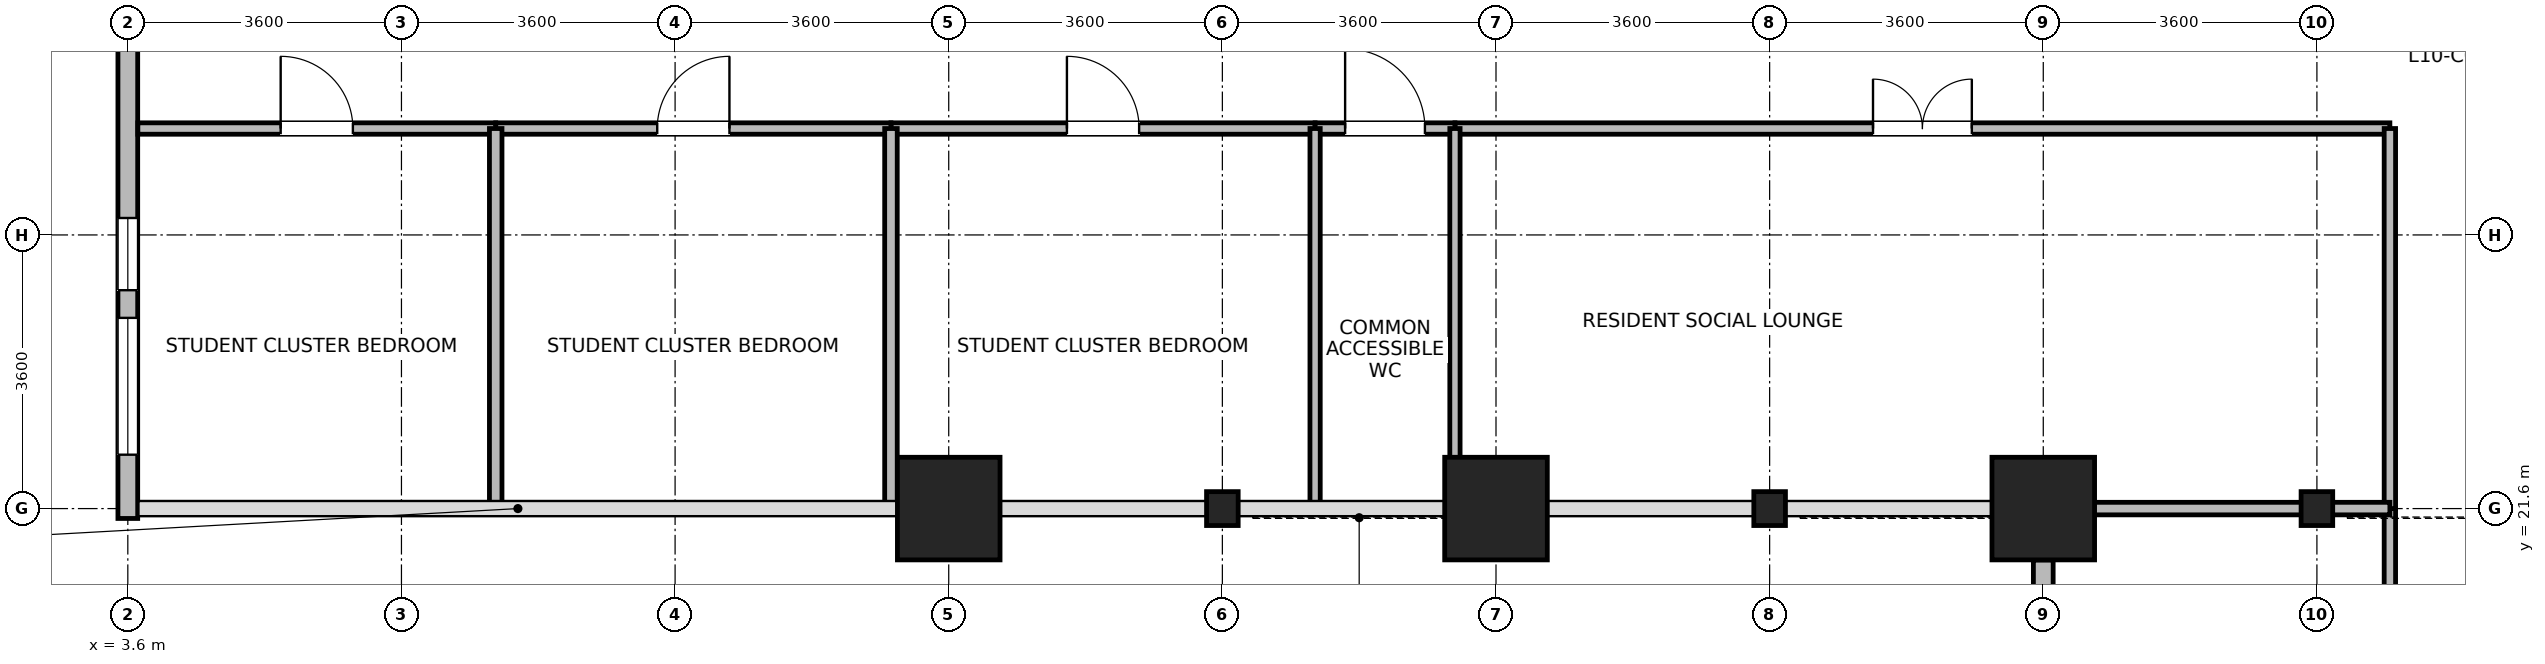
"""IFC4 building model, lengths in metres.
Left out: names, types, materials, properties, quantities, classifications, styles, units other than length and angle.
Written with IfcOpenShell. Run it as: python <this file> out.ifc"""

import sys

from ifc_helpers import new_model, si_unit, direction, frame, frame_2d, origin, origin_2d, place, context, subcontext, project, spatial, rectangle, i_section, extrude, source, transform, mapped, element, fill, save


model = new_model("IFC4")
c1 = context("Model", 3, precision=1e-05, world=origin(), true_north=direction((0.0, 1.0)))
c2 = subcontext(c1, "Body", "Model", "MODEL_VIEW")
j1 = project(units=[si_unit("LENGTHUNIT", "METRE"), si_unit("PLANEANGLEUNIT", "RADIAN")], contexts=[c1])
p1 = place(None, origin())
s1 = spatial("IfcSite", under=j1, at=p1, CompositionType="ELEMENT")
p2 = place(p1, origin())
s2 = spatial("IfcBuilding", under=s1, at=p2, CompositionType="ELEMENT")
p3 = place(p2, frame((0.0, 0.0, 43.8)))
s3 = spatial("IfcBuildingStorey", under=s2, at=p3, CompositionType="ELEMENT", Elevation=43.8)
m1 = source(origin(), c2, "Body", "SweptSolid", [
    extrude(rectangle(XDim=1.35, YDim=1.35, at=origin_2d()), origin(), (0.0, 0.0, 1.0), 3.7),
])
for number, where, z_axis, x_axis in (
    (1, (14.4, 21.6, 0.0), (0.0, 0.0, 1.0), (1.0, 0.0, 0.0)),
    (2, (21.6, 21.6, 0.0), (0.0, 0.0, 1.0), (1.0, 0.0, 0.0)),
    (3, (28.8, 21.6, 0.0), (0.0, 0.0, 1.0), (1.0, 0.0, 0.0)),
):
    element("IfcColumn", number, at=place(p3, frame(where, z_axis=z_axis, x_axis=x_axis)), inside=s3, PredefinedType="COLUMN", context=c2, shape_type="MappedRepresentation", body=[
        mapped(m1, transform((0.0, 0.0, 0.0), x_axis=(1.0, 0.0, 0.0), y_axis=(0.0, 1.0, 0.0), z_axis=(0.0, 0.0, 1.0), scale=1.0)),
    ])
m2 = source(origin(), c2, "Body", "SweptSolid", [
    extrude(i_section(OverallWidth=0.416, OverallDepth=0.446, WebThickness=0.029, FlangeThickness=0.04, FilletRadius=0.015, at=origin_2d()), origin(), (0.0, 0.0, 1.0), 3.7),
])
for number, where, z_axis, x_axis in (
    (4, (18.0, 21.6, 0.0), (0.0, 0.0, 1.0), (1.0, 0.0, 0.0)),
    (5, (25.2, 21.6, 0.0), (0.0, 0.0, 1.0), (1.0, 0.0, 0.0)),
    (6, (32.4, 21.6, 0.0), (0.0, 0.0, 1.0), (1.0, 0.0, 0.0)),
):
    element("IfcColumn", number, at=place(p3, frame(where, z_axis=z_axis, x_axis=x_axis)), inside=s3, PredefinedType="COLUMN", context=c2, shape_type="MappedRepresentation", body=[
        mapped(m2, transform((0.0, 0.0, 0.0), x_axis=(1.0, 0.0, 0.0), y_axis=(0.0, 1.0, 0.0), z_axis=(0.0, 0.0, 1.0), scale=1.0)),
    ])
p4 = place(p3, frame((3.6, 21.47, 0.0), z_axis=(0.0, 0.0, 1.0), x_axis=(0.0, 1.0, 0.0)))
e7 = element("IfcWall", 7, at=p4, inside=s3, PredefinedType="STANDARD", context=c2, shape_type="SweptSolid", body=[
    extrude(rectangle(XDim=6.956, YDim=0.26, at=frame_2d((3.478, 0.0))), origin(), (0.0, 0.0, 1.0), 3.43),
])
p5 = place(p4, frame((0.839, 0.0, 0.85)))
e8 = element("IfcOpeningElement", 8, at=p5, cuts=e7, PredefinedType="OPENING", context=c2, shape_type="SweptSolid", body=[
    extrude(rectangle(XDim=1.8, YDim=1.85, at=frame_2d((0.9, 0.925))), frame((0.0, 0.14, 0.0), z_axis=(0.0, -1.0, 0.0), x_axis=(1.0, 0.0, 0.0)), (0.0, 0.0, 1.0), 0.28),
])
p6 = place(p4, frame((3.003, 0.0, 0.85)))
e9 = element("IfcOpeningElement", 9, at=p6, cuts=e7, PredefinedType="OPENING", context=c2, shape_type="SweptSolid", body=[
    extrude(rectangle(XDim=0.95, YDim=1.75, at=frame_2d((0.475, 0.875))), frame((0.0, 0.14, 0.0), z_axis=(0.0, -1.0, 0.0), x_axis=(1.0, 0.0, 0.0)), (0.0, 0.0, 1.0), 0.28),
])
p7 = place(p3, frame((28.8, 1.67, 0.0), z_axis=(0.0, 0.0, 1.0), x_axis=(0.0, 1.0, 0.0)))
e10 = element("IfcWall", 10, at=p7, inside=s3, PredefinedType="STANDARD", context=c2, shape_type="SweptSolid", body=[
    extrude(rectangle(XDim=19.254, YDim=0.26, at=frame_2d((9.627, 0.0))), origin(), (0.0, 0.0, 1.0), 3.43),
])
p8 = place(p7, frame((0.705, 0.0, 0.85)))
e11 = element("IfcOpeningElement", 11, at=p8, cuts=e10, PredefinedType="OPENING", context=c2, shape_type="SweptSolid", body=[
    extrude(rectangle(XDim=1.8, YDim=1.85, at=frame_2d((0.9, 0.925))), frame((0.0, 0.14, 0.0), z_axis=(0.0, -1.0, 0.0), x_axis=(1.0, 0.0, 0.0)), (0.0, 0.0, 1.0), 0.28),
])
p9 = place(p7, frame((7.123, 0.0, 0.85)))
e12 = element("IfcOpeningElement", 12, at=p9, cuts=e10, PredefinedType="OPENING", context=c2, shape_type="SweptSolid", body=[
    extrude(rectangle(XDim=1.8, YDim=1.85, at=frame_2d((0.9, 0.925))), frame((0.0, 0.14, 0.0), z_axis=(0.0, -1.0, 0.0), x_axis=(1.0, 0.0, 0.0)), (0.0, 0.0, 1.0), 0.28),
])
p10 = place(p7, frame((10.332, 0.0, 0.85)))
e13 = element("IfcOpeningElement", 13, at=p10, cuts=e10, PredefinedType="OPENING", context=c2, shape_type="SweptSolid", body=[
    extrude(rectangle(XDim=1.8, YDim=1.85, at=frame_2d((0.9, 0.925))), frame((0.0, 0.14, 0.0), z_axis=(0.0, -1.0, 0.0), x_axis=(1.0, 0.0, 0.0)), (0.0, 0.0, 1.0), 0.28),
])
p11 = place(p7, frame((13.541, 0.0, 0.85)))
e14 = element("IfcOpeningElement", 14, at=p11, cuts=e10, PredefinedType="OPENING", context=c2, shape_type="SweptSolid", body=[
    extrude(rectangle(XDim=1.8, YDim=1.85, at=frame_2d((0.9, 0.925))), frame((0.0, 0.14, 0.0), z_axis=(0.0, -1.0, 0.0), x_axis=(1.0, 0.0, 0.0)), (0.0, 0.0, 1.0), 0.28),
])
p12 = place(p7, frame((16.75, 0.0, 0.85)))
e15 = element("IfcOpeningElement", 15, at=p12, cuts=e10, PredefinedType="OPENING", context=c2, shape_type="SweptSolid", body=[
    extrude(rectangle(XDim=1.8, YDim=1.85, at=frame_2d((0.9, 0.925))), frame((0.0, 0.14, 0.0), z_axis=(0.0, -1.0, 0.0), x_axis=(1.0, 0.0, 0.0)), (0.0, 0.0, 1.0), 0.28),
])
p13 = place(p3, frame((21.06, 26.6, 0.0), z_axis=(0.0, 0.0, 1.0), x_axis=(1.0, 0.0, 0.0)))
e16 = element("IfcWall", 16, at=p13, inside=s3, PredefinedType="PARTITIONING", context=c2, shape_type="SweptSolid", body=[
    extrude(rectangle(XDim=12.3, YDim=0.15, at=frame_2d((6.15, 0.0))), origin(), (0.0, 0.0, 1.0), 3.43),
])
p14 = place(p13, frame((5.5, 0.0, 0.0)))
e17 = element("IfcOpeningElement", 17, at=p14, cuts=e16, PredefinedType="OPENING", context=c2, shape_type="SweptSolid", body=[
    extrude(rectangle(XDim=1.3, YDim=2.12, at=frame_2d((0.65, 1.06))), frame((0.0, 0.085, 0.0), z_axis=(0.0, -1.0, 0.0), x_axis=(1.0, 0.0, 0.0)), (0.0, 0.0, 1.0), 0.17),
])
p15 = place(p3, frame((33.36, 14.5, 0.0), z_axis=(0.0, 0.0, 1.0), x_axis=(0.0, 1.0, 0.0)))
e18 = element("IfcWall", 18, at=p15, inside=s3, PredefinedType="PARTITIONING", context=c2, shape_type="SweptSolid", body=[
    extrude(rectangle(XDim=7.1, YDim=0.15, at=frame_2d((3.55, 0.0))), origin(), (0.0, 0.0, 1.0), 3.43),
])
p16 = place(p15, frame((2.9, 0.0, 0.0)))
e19 = element("IfcOpeningElement", 19, at=p16, cuts=e18, PredefinedType="OPENING", context=c2, shape_type="SweptSolid", body=[
    extrude(rectangle(XDim=1.3, YDim=2.12, at=frame_2d((0.65, 1.06))), frame((0.0, 0.085, 0.0), z_axis=(0.0, -1.0, 0.0), x_axis=(1.0, 0.0, 0.0)), (0.0, 0.0, 1.0), 0.17),
])
p17 = place(p3, frame((13.64, 26.6, 0.0), z_axis=(0.0, 0.0, 1.0), x_axis=(1.0, 0.0, 0.0)))
e20 = element("IfcWall", 20, at=p17, inside=s3, PredefinedType="PARTITIONING", context=c2, shape_type="SweptSolid", body=[
    extrude(rectangle(XDim=5.58, YDim=0.15, at=frame_2d((2.79, 0.0))), origin(), (0.0, 0.0, 1.0), 3.43),
])
p18 = place(p17, frame((2.315, 0.0, 0.0)))
e21 = element("IfcOpeningElement", 21, at=p18, cuts=e20, PredefinedType="OPENING", context=c2, shape_type="SweptSolid", body=[
    extrude(rectangle(XDim=0.95, YDim=2.1, at=frame_2d((0.475, 1.05))), frame((0.0, 0.085, 0.0), z_axis=(0.0, -1.0, 0.0), x_axis=(1.0, 0.0, 0.0)), (0.0, 0.0, 1.0), 0.17),
])
p19 = place(p3, frame((8.44, 26.6, 0.0), z_axis=(0.0, 0.0, 1.0), x_axis=(1.0, 0.0, 0.0)))
e22 = element("IfcWall", 22, at=p19, inside=s3, PredefinedType="PARTITIONING", context=c2, shape_type="SweptSolid", body=[
    extrude(rectangle(XDim=5.2, YDim=0.15, at=frame_2d((2.6, 0.0))), origin(), (0.0, 0.0, 1.0), 3.43),
])
p20 = place(p19, frame((2.125, 0.0, 0.0)))
e23 = element("IfcOpeningElement", 23, at=p20, cuts=e22, PredefinedType="OPENING", context=c2, shape_type="SweptSolid", body=[
    extrude(rectangle(XDim=0.95, YDim=2.1, at=frame_2d((0.475, 1.05))), frame((0.0, 0.085, 0.0), z_axis=(0.0, -1.0, 0.0), x_axis=(1.0, 0.0, 0.0)), (0.0, 0.0, 1.0), 0.17),
])
p21 = place(p3, frame((33.36, 21.6, 0.0), z_axis=(0.0, 0.0, 1.0), x_axis=(0.0, 1.0, 0.0)))
e24 = element("IfcWall", 24, at=p21, inside=s3, PredefinedType="PARTITIONING", context=c2, shape_type="SweptSolid", body=[
    extrude(rectangle(XDim=5.0, YDim=0.15, at=frame_2d((2.5, 0.0))), origin(), (0.0, 0.0, 1.0), 3.43),
])
p22 = place(p3, frame((3.732, 26.6, 0.0), z_axis=(0.0, 0.0, 1.0), x_axis=(1.0, 0.0, 0.0)))
e25 = element("IfcWall", 25, at=p22, inside=s3, PredefinedType="PARTITIONING", context=c2, shape_type="SweptSolid", body=[
    extrude(rectangle(XDim=4.708, YDim=0.15, at=frame_2d((2.354, 0.0))), origin(), (0.0, 0.0, 1.0), 3.43),
])
p23 = place(p22, frame((1.879, 0.0, 0.0)))
e26 = element("IfcOpeningElement", 26, at=p23, cuts=e25, PredefinedType="OPENING", context=c2, shape_type="SweptSolid", body=[
    extrude(rectangle(XDim=0.95, YDim=2.1, at=frame_2d((0.475, 1.05))), frame((0.0, 0.085, 0.0), z_axis=(0.0, -1.0, 0.0), x_axis=(1.0, 0.0, 0.0)), (0.0, 0.0, 1.0), 0.17),
])
p24 = place(p3, frame((19.22, 26.6, 0.0), z_axis=(0.0, 0.0, 1.0), x_axis=(1.0, 0.0, 0.0)))
e27 = element("IfcWall", 27, at=p24, inside=s3, PredefinedType="PARTITIONING", context=c2, shape_type="SweptSolid", body=[
    extrude(rectangle(XDim=1.84, YDim=0.15, at=frame_2d((0.92, 0.0))), origin(), (0.0, 0.0, 1.0), 3.43),
])
p25 = place(p24, frame((0.395, 0.0, 0.0)))
e28 = element("IfcOpeningElement", 28, at=p25, cuts=e27, PredefinedType="OPENING", context=c2, shape_type="SweptSolid", body=[
    extrude(rectangle(XDim=1.05, YDim=2.12, at=frame_2d((0.525, 1.06))), frame((0.0, 0.085, 0.0), z_axis=(0.0, -1.0, 0.0), x_axis=(1.0, 0.0, 0.0)), (0.0, 0.0, 1.0), 0.17),
])
for number, where, z_axis, x_axis in (
    (29, (8.44, 21.62, 0.0), (0.0, 0.0, 1.0), (0.0, 1.0, 0.0)),
    (30, (13.64, 21.62, 0.0), (0.0, 0.0, 1.0), (0.0, 1.0, 0.0)),
):
    element("IfcWall", number, at=place(p3, frame(where, z_axis=z_axis, x_axis=x_axis)), inside=s3, PredefinedType="PARTITIONING", context=c2, shape_type="SweptSolid", body=[
        extrude(rectangle(XDim=4.98, YDim=0.165, at=frame_2d((2.49, 0.0))), origin(), (0.0, 0.0, 1.0), 3.43),
    ])
p26 = place(p3, frame((19.22, 21.62, 0.0), z_axis=(0.0, 0.0, 1.0), x_axis=(0.0, 1.0, 0.0)))
e31 = element("IfcWall", 31, at=p26, inside=s3, PredefinedType="PARTITIONING", context=c2, shape_type="SweptSolid", body=[
    extrude(rectangle(XDim=4.98, YDim=0.135, at=frame_2d((2.49, 0.0))), origin(), (0.0, 0.0, 1.0), 3.43),
])
p27 = place(p3, frame((21.06, 21.732, 0.0), z_axis=(0.0, 0.0, 1.0), x_axis=(0.0, 1.0, 0.0)))
e32 = element("IfcWall", 32, at=p27, inside=s3, PredefinedType="PARTITIONING", context=c2, shape_type="SweptSolid", body=[
    extrude(rectangle(XDim=4.868, YDim=0.135, at=frame_2d((2.434, 0.0))), origin(), (0.0, 0.0, 1.0), 3.43),
])
p28 = place(p3, frame((28.932, 21.6, 0.0), z_axis=(0.0, 0.0, 1.0), x_axis=(1.0, 0.0, 0.0)))
e33 = element("IfcWall", 33, at=p28, inside=s3, PredefinedType="PARTITIONING", context=c2, shape_type="SweptSolid", body=[
    extrude(rectangle(XDim=4.428, YDim=0.165, at=frame_2d((2.214, 0.0))), origin(), (0.0, 0.0, 1.0), 2.93),
])
p29 = place(p5, origin())
e34 = element("IfcWindow", 34, at=p29, inside=s3, PartitioningType="SINGLE_PANEL", PredefinedType="WINDOW", context=c2, shape_type="SweptSolid", body=[
    extrude(rectangle(XDim=1.8, YDim=1.85, at=frame_2d((0.9, 0.925))), frame((0.0, 0.03, 0.0), z_axis=(0.0, -1.0, 0.0), x_axis=(1.0, 0.0, 0.0)), (0.0, 0.0, 1.0), 0.06),
])
fill(e8, e34)
p30 = place(p6, origin())
e35 = element("IfcWindow", 35, at=p30, inside=s3, PartitioningType="SINGLE_PANEL", PredefinedType="WINDOW", context=c2, shape_type="SweptSolid", body=[
    extrude(rectangle(XDim=0.95, YDim=1.75, at=frame_2d((0.475, 0.875))), frame((0.0, 0.03, 0.0), z_axis=(0.0, -1.0, 0.0), x_axis=(1.0, 0.0, 0.0)), (0.0, 0.0, 1.0), 0.06),
])
fill(e9, e35)
p31 = place(p14, origin())
e36 = element("IfcDoor", 36, at=p31, inside=s3, OperationType="DOUBLE_DOOR_SINGLE_SWING", PredefinedType="DOOR", context=c2, shape_type="SweptSolid", body=[
    extrude(rectangle(XDim=1.3, YDim=2.12, at=frame_2d((0.65, 1.06))), frame((0.0, 0.025, 0.0), z_axis=(0.0, -1.0, 0.0), x_axis=(1.0, 0.0, 0.0)), (0.0, 0.0, 1.0), 0.05),
])
fill(e17, e36)
p32 = place(p18, origin())
e37 = element("IfcDoor", 37, at=p32, inside=s3, OperationType="SINGLE_SWING_LEFT", PredefinedType="DOOR", context=c2, shape_type="SweptSolid", body=[
    extrude(rectangle(XDim=0.95, YDim=2.1, at=frame_2d((0.475, 1.05))), frame((0.0, 0.025, 0.0), z_axis=(0.0, -1.0, 0.0), x_axis=(1.0, 0.0, 0.0)), (0.0, 0.0, 1.0), 0.05),
])
fill(e21, e37)
p33 = place(p20, origin())
e38 = element("IfcDoor", 38, at=p33, inside=s3, OperationType="SINGLE_SWING_RIGHT", PredefinedType="DOOR", context=c2, shape_type="SweptSolid", body=[
    extrude(rectangle(XDim=0.95, YDim=2.1, at=frame_2d((0.475, 1.05))), frame((0.0, 0.025, 0.0), z_axis=(0.0, -1.0, 0.0), x_axis=(1.0, 0.0, 0.0)), (0.0, 0.0, 1.0), 0.05),
])
fill(e23, e38)
p34 = place(p23, origin())
e39 = element("IfcDoor", 39, at=p34, inside=s3, OperationType="SINGLE_SWING_LEFT", PredefinedType="DOOR", context=c2, shape_type="SweptSolid", body=[
    extrude(rectangle(XDim=0.95, YDim=2.1, at=frame_2d((0.475, 1.05))), frame((0.0, 0.025, 0.0), z_axis=(0.0, -1.0, 0.0), x_axis=(1.0, 0.0, 0.0)), (0.0, 0.0, 1.0), 0.05),
])
fill(e26, e39)
p35 = place(p25, origin())
e40 = element("IfcDoor", 40, at=p35, inside=s3, OperationType="SINGLE_SWING_LEFT", PredefinedType="DOOR", context=c2, shape_type="SweptSolid", body=[
    extrude(rectangle(XDim=1.05, YDim=2.12, at=frame_2d((0.525, 1.06))), frame((0.0, 0.025, 0.0), z_axis=(0.0, -1.0, 0.0), x_axis=(1.0, 0.0, 0.0)), (0.0, 0.0, 1.0), 0.05),
])
fill(e28, e40)
save(model, sys.argv[1])
